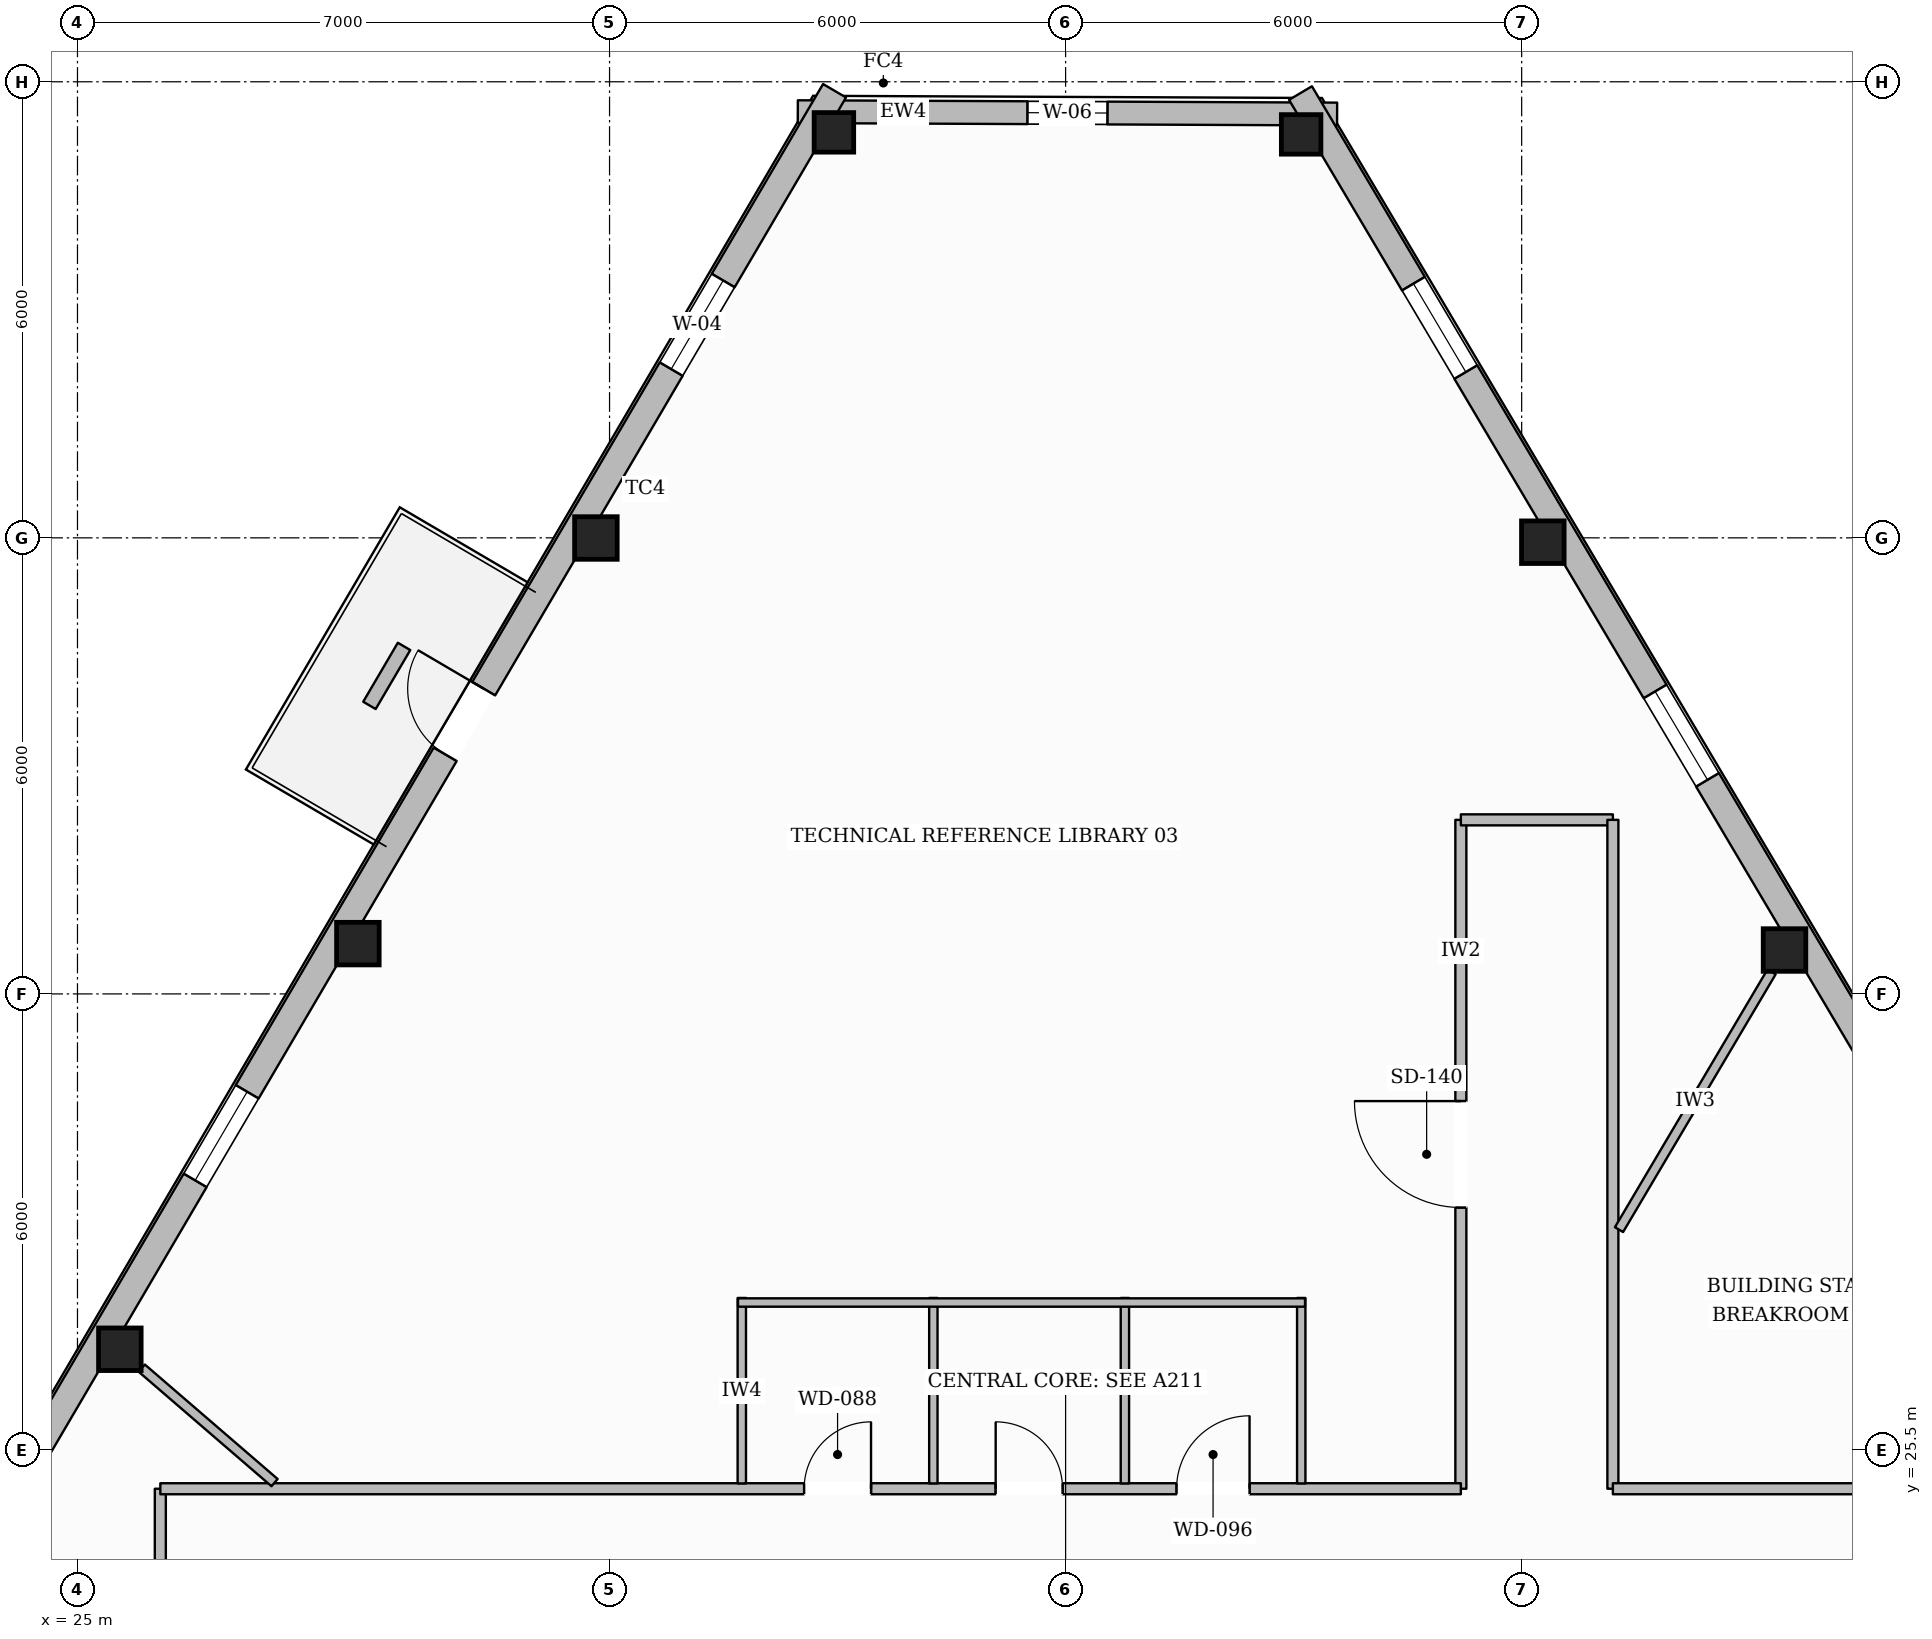
"""IFC4 building model, lengths in metres.
Left out: names, types, materials, properties, quantities, classifications, styles, units other than length and angle.
Written with IfcOpenShell. Run it as: python <this file> out.ifc"""

import sys

from ifc_helpers import new_model, si_unit, direction, frame, frame_2d, origin, origin_2d, place, context, subcontext, project, spatial, rectangle, hollow_rectangle, extrude, element, fill, save


model = new_model("IFC4")
c1 = context("Model", 3, precision=1e-05, world=origin(), true_north=direction((0.0, 1.0)))
c2 = subcontext(c1, "Body", "Model", "MODEL_VIEW")
j1 = project(units=[si_unit("LENGTHUNIT", "METRE"), si_unit("PLANEANGLEUNIT", "RADIAN")], contexts=[c1])
p1 = place(None, origin())
s1 = spatial("IfcSite", under=j1, at=p1, CompositionType="ELEMENT")
p2 = place(p1, origin())
s2 = spatial("IfcBuilding", under=s1, at=p2, CompositionType="ELEMENT")
p3 = place(p2, frame((0.0, 0.0, 270.3)))
s3 = spatial("IfcBuildingStorey", under=s2, at=p3, CompositionType="ELEMENT", Elevation=270.3)
p4 = place(p3, frame((34.952, 42.834, 0.0), z_axis=(0.0, 0.0, 1.0), x_axis=(1.0, 0.0, 0.0)))
e1 = element("IfcColumn", 1, at=p4, inside=s3, PredefinedType="COLUMN", context=c2, shape_type="SweptSolid", body=[
    extrude(hollow_rectangle(XDim=0.52, YDim=0.52, WallThickness=0.024, at=origin_2d()), origin(), (0.0, 0.0, 1.0), 3.61),
])
for number, where, z_axis, x_axis in (
    (2, (31.821, 37.498, 0.0), (0.0, 0.0, 1.0), (1.0, 0.0, 0.0)),
    (3, (28.689, 32.162, 0.0), (0.0, 0.0, 1.0), (1.0, 0.0, 0.0)),
    (4, (25.558, 26.825, 0.0), (0.0, 0.0, 1.0), (1.0, 0.0, 0.0)),
    (5, (47.458, 32.077, 0.0), (0.0, 0.0, 1.0), (1.0, 0.0, 0.0)),
    (6, (44.278, 37.443, 0.0), (0.0, 0.0, 1.0), (1.0, 0.0, 0.0)),
):
    element("IfcColumn", number, at=place(p3, frame(where, z_axis=z_axis, x_axis=x_axis)), inside=s3, PredefinedType="COLUMN", context=c2, shape_type="SweptSolid", body=[
        extrude(hollow_rectangle(XDim=0.56, YDim=0.56, WallThickness=0.025, at=origin_2d()), origin(), (0.0, 0.0, 1.0), 3.61),
    ])
p5 = place(p3, frame((41.099, 42.808, 0.0), z_axis=(0.0, 0.0, 1.0), x_axis=(1.0, 0.0, 0.0)))
e7 = element("IfcColumn", 7, at=p5, inside=s3, PredefinedType="COLUMN", context=c2, shape_type="SweptSolid", body=[
    extrude(hollow_rectangle(XDim=0.52, YDim=0.52, WallThickness=0.024, at=origin_2d()), origin(), (0.0, 0.0, 1.0), 3.61),
])
p6 = place(p3, frame((34.477, 43.106, 0.0), z_axis=(0.0, 0.0, 1.0), x_axis=(0.999990601599, -0.004335517714, 0.0)))
e8 = element("IfcWall", 8, at=p6, inside=s3, PredefinedType="STANDARD", context=c2, shape_type="SweptSolid", body=[
    extrude(rectangle(XDim=7.095, YDim=0.3, at=frame_2d((3.548, 0.0))), origin(), (0.0, 0.0, 1.0), 3.196),
])
p7 = place(p6, frame((3.023, 0.0, 0.65)))
e9 = element("IfcOpeningElement", 9, at=p7, cuts=e8, PredefinedType="OPENING", context=c2, shape_type="SweptSolid", body=[
    extrude(rectangle(XDim=1.05, YDim=1.7, at=frame_2d((0.525, 0.85))), frame((0.0, 0.16, 0.0), z_axis=(0.0, -1.0, 0.0), x_axis=(1.0, 0.0, 0.0)), (0.0, 0.0, 1.0), 0.32),
])
p8 = place(p3, frame((15.686, 10.536, 0.0), z_axis=(0.0, 0.0, 1.0), x_axis=(0.506100645038, 0.862474426921, 0.0)))
e10 = element("IfcWall", 10, at=p8, inside=s3, PredefinedType="STANDARD", context=c2, shape_type="SweptSolid", body=[
    extrude(rectangle(XDim=38.084, YDim=0.35, at=frame_2d((19.042, 0.0))), origin(), (0.0, 0.0, 1.0), 3.196),
])
p9 = place(p8, frame((27.963, 0.0, 0.0)))
e11 = element("IfcOpeningElement", 11, at=p9, cuts=e10, PredefinedType="OPENING", context=c2, shape_type="SweptSolid", body=[
    extrude(rectangle(XDim=1.0, YDim=2.2, at=frame_2d((0.5, 1.1))), frame((0.0, 0.185, 0.0), z_axis=(0.0, -1.0, 0.0), x_axis=(1.0, 0.0, 0.0)), (0.0, 0.0, 1.0), 0.37),
])
p10 = place(p8, frame((33.839, 0.0, 0.65)))
e12 = element("IfcOpeningElement", 12, at=p10, cuts=e10, PredefinedType="OPENING", context=c2, shape_type="SweptSolid", body=[
    extrude(rectangle(XDim=1.35, YDim=1.75, at=frame_2d((0.675, 0.875))), frame((0.0, 0.185, 0.0), z_axis=(0.0, -1.0, 0.0), x_axis=(1.0, 0.0, 0.0)), (0.0, 0.0, 1.0), 0.37),
])
p11 = place(p8, frame((21.464, 0.0, 0.65)))
e13 = element("IfcOpeningElement", 13, at=p11, cuts=e10, PredefinedType="OPENING", context=c2, shape_type="SweptSolid", body=[
    extrude(rectangle(XDim=1.35, YDim=1.75, at=frame_2d((0.675, 0.875))), frame((0.0, 0.185, 0.0), z_axis=(0.0, -1.0, 0.0), x_axis=(1.0, 0.0, 0.0)), (0.0, 0.0, 1.0), 0.37),
])
p12 = place(p8, frame((9.089, 0.0, 0.65)))
e14 = element("IfcOpeningElement", 14, at=p12, cuts=e10, PredefinedType="OPENING", context=c2, shape_type="SweptSolid", body=[
    extrude(rectangle(XDim=1.35, YDim=1.75, at=frame_2d((0.675, 0.875))), frame((0.0, 0.185, 0.0), z_axis=(0.0, -1.0, 0.0), x_axis=(1.0, 0.0, 0.0)), (0.0, 0.0, 1.0), 0.37),
])
p13 = place(p8, frame((2.902, 0.0, 0.65)))
e15 = element("IfcOpeningElement", 15, at=p13, cuts=e10, PredefinedType="OPENING", context=c2, shape_type="SweptSolid", body=[
    extrude(rectangle(XDim=1.35, YDim=1.75, at=frame_2d((0.675, 0.875))), frame((0.0, 0.185, 0.0), z_axis=(0.0, -1.0, 0.0), x_axis=(1.0, 0.0, 0.0)), (0.0, 0.0, 1.0), 0.37),
])
p14 = place(p3, frame((41.09, 43.352, 0.0), z_axis=(0.0, 0.0, 1.0), x_axis=(0.509850521087, -0.860263009868, 0.0)))
e16 = element("IfcWall", 16, at=p14, inside=s3, PredefinedType="STANDARD", context=c2, shape_type="SweptSolid", body=[
    extrude(rectangle(XDim=38.375, YDim=0.35, at=frame_2d((19.188, 0.0))), origin(), (0.0, 0.0, 1.0), 3.196),
])
p15 = place(p14, frame((28.181, 0.0, 0.0)))
e17 = element("IfcOpeningElement", 17, at=p15, cuts=e16, PredefinedType="OPENING", context=c2, shape_type="SweptSolid", body=[
    extrude(rectangle(XDim=1.0, YDim=2.2, at=frame_2d((0.5, 1.1))), frame((0.0, 0.185, 0.0), z_axis=(0.0, -1.0, 0.0), x_axis=(1.0, 0.0, 0.0)), (0.0, 0.0, 1.0), 0.37),
])
p16 = place(p14, frame((34.098, 0.0, 0.65)))
e18 = element("IfcOpeningElement", 18, at=p16, cuts=e16, PredefinedType="OPENING", context=c2, shape_type="SweptSolid", body=[
    extrude(rectangle(XDim=1.35, YDim=1.75, at=frame_2d((0.675, 0.875))), frame((0.0, 0.185, 0.0), z_axis=(0.0, -1.0, 0.0), x_axis=(1.0, 0.0, 0.0)), (0.0, 0.0, 1.0), 0.37),
])
p17 = place(p14, frame((21.625, 0.0, 0.65)))
e19 = element("IfcOpeningElement", 19, at=p17, cuts=e16, PredefinedType="OPENING", context=c2, shape_type="SweptSolid", body=[
    extrude(rectangle(XDim=1.35, YDim=1.75, at=frame_2d((0.675, 0.875))), frame((0.0, 0.185, 0.0), z_axis=(0.0, -1.0, 0.0), x_axis=(1.0, 0.0, 0.0)), (0.0, 0.0, 1.0), 0.37),
])
p18 = place(p14, frame((9.152, 0.0, 0.65)))
e20 = element("IfcOpeningElement", 20, at=p18, cuts=e16, PredefinedType="OPENING", context=c2, shape_type="SweptSolid", body=[
    extrude(rectangle(XDim=1.35, YDim=1.75, at=frame_2d((0.675, 0.875))), frame((0.0, 0.185, 0.0), z_axis=(0.0, -1.0, 0.0), x_axis=(1.0, 0.0, 0.0)), (0.0, 0.0, 1.0), 0.37),
])
p19 = place(p14, frame((2.915, 0.0, 0.65)))
e21 = element("IfcOpeningElement", 21, at=p19, cuts=e16, PredefinedType="OPENING", context=c2, shape_type="SweptSolid", body=[
    extrude(rectangle(XDim=1.35, YDim=1.75, at=frame_2d((0.675, 0.875))), frame((0.0, 0.185, 0.0), z_axis=(0.0, -1.0, 0.0), x_axis=(1.0, 0.0, 0.0)), (0.0, 0.0, 1.0), 0.37),
])
p20 = place(p3, frame((29.297, 36.072, 0.0), z_axis=(0.0, 0.0, 1.0), x_axis=(-0.50621372759, -0.862408060027, 0.0)))
e22 = element("IfcWall", 22, at=p20, inside=s3, PredefinedType="USERDEFINED", context=c2, shape_type="SweptSolid", body=[
    extrude(rectangle(XDim=0.9, YDim=0.19, at=frame_2d((0.45, 0.0))), origin(), (0.0, 0.0, 1.0), 0.5),
])
p21 = place(p3, frame((43.2, 24.99, 0.0), z_axis=(0.0, 0.0, 1.0), x_axis=(0.0, 1.0, 0.0)))
e23 = element("IfcWall", 23, at=p21, inside=s3, PredefinedType="PARTITIONING", context=c2, shape_type="SweptSolid", body=[
    extrude(rectangle(XDim=8.8, YDim=0.145, at=frame_2d((4.4, 0.0))), origin(), (0.0, 0.0, 1.0), 3.61),
])
p22 = place(p21, frame((3.7, 0.0, 0.0)))
e24 = element("IfcOpeningElement", 24, at=p22, cuts=e23, PredefinedType="OPENING", context=c2, shape_type="SweptSolid", body=[
    extrude(rectangle(XDim=1.4, YDim=2.2, at=frame_2d((0.7, 1.1))), frame((0.0, 0.083, 0.0), z_axis=(0.0, -1.0, 0.0), x_axis=(1.0, 0.0, 0.0)), (0.0, 0.0, 1.0), 0.165),
])
p23 = place(p3, frame((43.2, 33.79, 0.0), z_axis=(0.0, 0.0, 1.0), x_axis=(1.0, 0.0, 0.0)))
e25 = element("IfcWall", 25, at=p23, inside=s3, PredefinedType="PARTITIONING", context=c2, shape_type="SweptSolid", body=[
    extrude(rectangle(XDim=2.0, YDim=0.145, at=frame_2d((1.0, 0.0))), origin(), (0.0, 0.0, 1.0), 3.61),
])
p24 = place(p3, frame((45.2, 33.79, 0.0), z_axis=(0.0, 0.0, 1.0), x_axis=(0.0, -1.0, 0.0)))
e26 = element("IfcWall", 26, at=p24, inside=s3, PredefinedType="PARTITIONING", context=c2, shape_type="SweptSolid", body=[
    extrude(rectangle(XDim=8.8, YDim=0.145, at=frame_2d((4.4, 0.0))), origin(), (0.0, 0.0, 1.0), 3.61),
])
p25 = place(p3, frame((45.2, 24.99, 0.0), z_axis=(0.0, 0.0, 1.0), x_axis=(1.0, 0.0, 0.0)))
e27 = element("IfcWall", 27, at=p25, inside=s3, PredefinedType="PARTITIONING", context=c2, shape_type="SweptSolid", body=[
    extrude(rectangle(XDim=4.71, YDim=0.145, at=frame_2d((2.355, 0.0))), origin(), (0.0, 0.0, 1.0), 3.61),
])
p26 = place(p3, frame((26.09, 7.21, 0.0), z_axis=(0.0, 0.0, 1.0), x_axis=(0.0, 1.0, 0.0)))
e28 = element("IfcWall", 28, at=p26, inside=s3, PredefinedType="PARTITIONING", context=c2, shape_type="SweptSolid", body=[
    extrude(rectangle(XDim=17.78, YDim=0.145, at=frame_2d((8.89, 0.0))), origin(), (0.0, 0.0, 1.0), 3.349),
])
p27 = place(p26, frame((9.416, 0.0, 0.0)))
e29 = element("IfcOpeningElement", 29, at=p27, cuts=e28, PredefinedType="OPENING", context=c2, shape_type="SweptSolid", body=[
    extrude(rectangle(XDim=0.98, YDim=2.15, at=frame_2d((0.49, 1.075))), frame((0.0, 0.083, 0.0), z_axis=(0.0, -1.0, 0.0), x_axis=(1.0, 0.0, 0.0)), (0.0, 0.0, 1.0), 0.165),
])
p28 = place(p3, frame((26.09, 24.99, 0.0), z_axis=(0.0, 0.0, 1.0), x_axis=(1.0, 0.0, 0.0)))
e30 = element("IfcWall", 30, at=p28, inside=s3, PredefinedType="PARTITIONING", context=c2, shape_type="SweptSolid", body=[
    extrude(rectangle(XDim=17.11, YDim=0.145, at=frame_2d((8.555, 0.0))), origin(), (0.0, 0.0, 1.0), 3.61),
])
p29 = place(p28, frame((8.47, 0.0, 0.0)))
e31 = element("IfcOpeningElement", 31, at=p29, cuts=e30, PredefinedType="OPENING", context=c2, shape_type="SweptSolid", body=[
    extrude(rectangle(XDim=0.88, YDim=2.1, at=frame_2d((0.44, 1.05))), frame((0.0, 0.083, 0.0), z_axis=(0.0, -1.0, 0.0), x_axis=(1.0, 0.0, 0.0)), (0.0, 0.0, 1.0), 0.165),
])
p30 = place(p28, frame((10.99, 0.0, 0.0)))
e32 = element("IfcOpeningElement", 32, at=p30, cuts=e30, PredefinedType="OPENING", context=c2, shape_type="SweptSolid", body=[
    extrude(rectangle(XDim=0.88, YDim=2.1, at=frame_2d((0.44, 1.05))), frame((0.0, 0.083, 0.0), z_axis=(0.0, -1.0, 0.0), x_axis=(1.0, 0.0, 0.0)), (0.0, 0.0, 1.0), 0.165),
])
p31 = place(p28, frame((13.37, 0.0, 0.0)))
e33 = element("IfcOpeningElement", 33, at=p31, cuts=e30, PredefinedType="OPENING", context=c2, shape_type="SweptSolid", body=[
    extrude(rectangle(XDim=0.96, YDim=2.1, at=frame_2d((0.48, 1.05))), frame((0.0, 0.083, 0.0), z_axis=(0.0, -1.0, 0.0), x_axis=(1.0, 0.0, 0.0)), (0.0, 0.0, 1.0), 0.165),
])
for number, where, z_axis, x_axis in (
    (34, (33.74, 25.06, 0.0), (0.0, 0.0, 1.0), (0.0, 1.0, 0.0)),
    (35, (36.26, 25.06, 0.0), (0.0, 0.0, 1.0), (0.0, 1.0, 0.0)),
    (36, (38.78, 25.06, 0.0), (0.0, 0.0, 1.0), (0.0, 1.0, 0.0)),
):
    element("IfcWall", number, at=place(p3, frame(where, z_axis=z_axis, x_axis=x_axis)), inside=s3, PredefinedType="PLUMBINGWALL", context=c2, shape_type="SweptSolid", body=[
        extrude(rectangle(XDim=2.44, YDim=0.11, at=frame_2d((1.22, 0.0))), origin(), (0.0, 0.0, 1.0), 3.61),
    ])
p32 = place(p3, frame((41.1, 25.06, 0.0), z_axis=(0.0, 0.0, 1.0), x_axis=(0.0, 1.0, 0.0)))
e37 = element("IfcWall", 37, at=p32, inside=s3, PredefinedType="PLUMBINGWALL", context=c2, shape_type="SweptSolid", body=[
    extrude(rectangle(XDim=2.44, YDim=0.11, at=frame_2d((1.22, 0.0))), origin(), (0.0, 0.0, 1.0), 3.246),
])
p33 = place(p3, frame((33.69, 27.44, 0.0), z_axis=(0.0, 0.0, 1.0), x_axis=(1.0, 0.0, 0.0)))
e38 = element("IfcWall", 38, at=p33, inside=s3, PredefinedType="PLUMBINGWALL", context=c2, shape_type="SweptSolid", body=[
    extrude(rectangle(XDim=7.46, YDim=0.11, at=frame_2d((3.73, 0.0))), origin(), (0.0, 0.0, 1.0), 3.61),
])
p34 = place(p3, frame((45.281, 28.399, 0.0), z_axis=(0.0, 0.0, 1.0), x_axis=(0.509420165647, 0.860517922435, 0.0)))
e39 = element("IfcWall", 39, at=p34, inside=s3, PredefinedType="PARTITIONING", context=c2, shape_type="SweptSolid", body=[
    extrude(rectangle(XDim=3.94, YDim=0.125, at=frame_2d((1.97, 0.0))), origin(), (0.0, 0.0, 1.0), 3.61),
])
p35 = place(p3, frame((27.593, 25.071, 0.0), z_axis=(0.0, 0.0, 1.0), x_axis=(-0.757498383129, 0.652837039051, 0.0)))
e40 = element("IfcWall", 40, at=p35, inside=s3, PredefinedType="PARTITIONING", context=c2, shape_type="SweptSolid", body=[
    extrude(rectangle(XDim=2.307, YDim=0.125, at=frame_2d((1.154, 0.0))), origin(), (0.0, 0.0, 1.0), 3.61),
])
p36 = place(p9, origin())
e41 = element("IfcDoor", 41, at=p36, inside=s3, OperationType="SINGLE_SWING_RIGHT", PredefinedType="DOOR", context=c2, shape_type="SweptSolid", body=[
    extrude(rectangle(XDim=1.0, YDim=2.2, at=frame_2d((0.5, 1.1))), frame((0.0, 0.025, 0.0), z_axis=(0.0, -1.0, 0.0), x_axis=(1.0, 0.0, 0.0)), (0.0, 0.0, 1.0), 0.05),
])
fill(e11, e41)
p37 = place(p10, origin())
e42 = element("IfcWindow", 42, at=p37, inside=s3, PartitioningType="SINGLE_PANEL", PredefinedType="WINDOW", context=c2, shape_type="SweptSolid", body=[
    extrude(rectangle(XDim=1.35, YDim=1.75, at=frame_2d((0.675, 0.875))), frame((0.0, 0.03, 0.0), z_axis=(0.0, -1.0, 0.0), x_axis=(1.0, 0.0, 0.0)), (0.0, 0.0, 1.0), 0.06),
])
fill(e12, e42)
p38 = place(p11, origin())
e43 = element("IfcWindow", 43, at=p38, inside=s3, PartitioningType="SINGLE_PANEL", PredefinedType="WINDOW", context=c2, shape_type="SweptSolid", body=[
    extrude(rectangle(XDim=1.35, YDim=1.75, at=frame_2d((0.675, 0.875))), frame((0.0, 0.03, 0.0), z_axis=(0.0, -1.0, 0.0), x_axis=(1.0, 0.0, 0.0)), (0.0, 0.0, 1.0), 0.06),
])
fill(e13, e43)
p39 = place(p18, origin())
e44 = element("IfcWindow", 44, at=p39, inside=s3, PartitioningType="SINGLE_PANEL", PredefinedType="WINDOW", context=c2, shape_type="SweptSolid", body=[
    extrude(rectangle(XDim=1.35, YDim=1.75, at=frame_2d((0.675, 0.875))), frame((0.0, 0.03, 0.0), z_axis=(0.0, -1.0, 0.0), x_axis=(1.0, 0.0, 0.0)), (0.0, 0.0, 1.0), 0.06),
])
fill(e20, e44)
p40 = place(p19, origin())
e45 = element("IfcWindow", 45, at=p40, inside=s3, PartitioningType="SINGLE_PANEL", PredefinedType="WINDOW", context=c2, shape_type="SweptSolid", body=[
    extrude(rectangle(XDim=1.35, YDim=1.75, at=frame_2d((0.675, 0.875))), frame((0.0, 0.03, 0.0), z_axis=(0.0, -1.0, 0.0), x_axis=(1.0, 0.0, 0.0)), (0.0, 0.0, 1.0), 0.06),
])
fill(e21, e45)
p41 = place(p7, origin())
e46 = element("IfcWindow", 46, at=p41, inside=s3, PartitioningType="SINGLE_PANEL", PredefinedType="WINDOW", context=c2, shape_type="SweptSolid", body=[
    extrude(rectangle(XDim=1.05, YDim=1.7, at=frame_2d((0.525, 0.85))), frame((0.0, 0.03, 0.0), z_axis=(0.0, -1.0, 0.0), x_axis=(1.0, 0.0, 0.0)), (0.0, 0.0, 1.0), 0.06),
])
fill(e9, e46)
p42 = place(p29, origin())
e47 = element("IfcDoor", 47, at=p42, inside=s3, OperationType="SINGLE_SWING_RIGHT", PredefinedType="DOOR", context=c2, shape_type="SweptSolid", body=[
    extrude(rectangle(XDim=0.88, YDim=2.1, at=frame_2d((0.44, 1.05))), frame((0.0, 0.025, 0.0), z_axis=(0.0, -1.0, 0.0), x_axis=(1.0, 0.0, 0.0)), (0.0, 0.0, 1.0), 0.05),
])
fill(e31, e47)
p43 = place(p30, origin())
e48 = element("IfcDoor", 48, at=p43, inside=s3, OperationType="SINGLE_SWING_LEFT", PredefinedType="DOOR", context=c2, shape_type="SweptSolid", body=[
    extrude(rectangle(XDim=0.88, YDim=2.1, at=frame_2d((0.44, 1.05))), frame((0.0, 0.025, 0.0), z_axis=(0.0, -1.0, 0.0), x_axis=(1.0, 0.0, 0.0)), (0.0, 0.0, 1.0), 0.05),
])
fill(e32, e48)
p44 = place(p31, origin())
e49 = element("IfcDoor", 49, at=p44, inside=s3, OperationType="SINGLE_SWING_RIGHT", PredefinedType="DOOR", context=c2, shape_type="SweptSolid", body=[
    extrude(rectangle(XDim=0.96, YDim=2.1, at=frame_2d((0.48, 1.05))), frame((0.0, 0.025, 0.0), z_axis=(0.0, -1.0, 0.0), x_axis=(1.0, 0.0, 0.0)), (0.0, 0.0, 1.0), 0.05),
])
fill(e33, e49)
p45 = place(p22, origin())
e50 = element("IfcDoor", 50, at=p45, inside=s3, OperationType="SINGLE_SWING_RIGHT", PredefinedType="DOOR", context=c2, shape_type="SweptSolid", body=[
    extrude(rectangle(XDim=1.4, YDim=2.2, at=frame_2d((0.7, 1.1))), frame((0.0, 0.025, 0.0), z_axis=(0.0, -1.0, 0.0), x_axis=(1.0, 0.0, 0.0)), (0.0, 0.0, 1.0), 0.05),
])
fill(e24, e50)
save(model, sys.argv[1])
